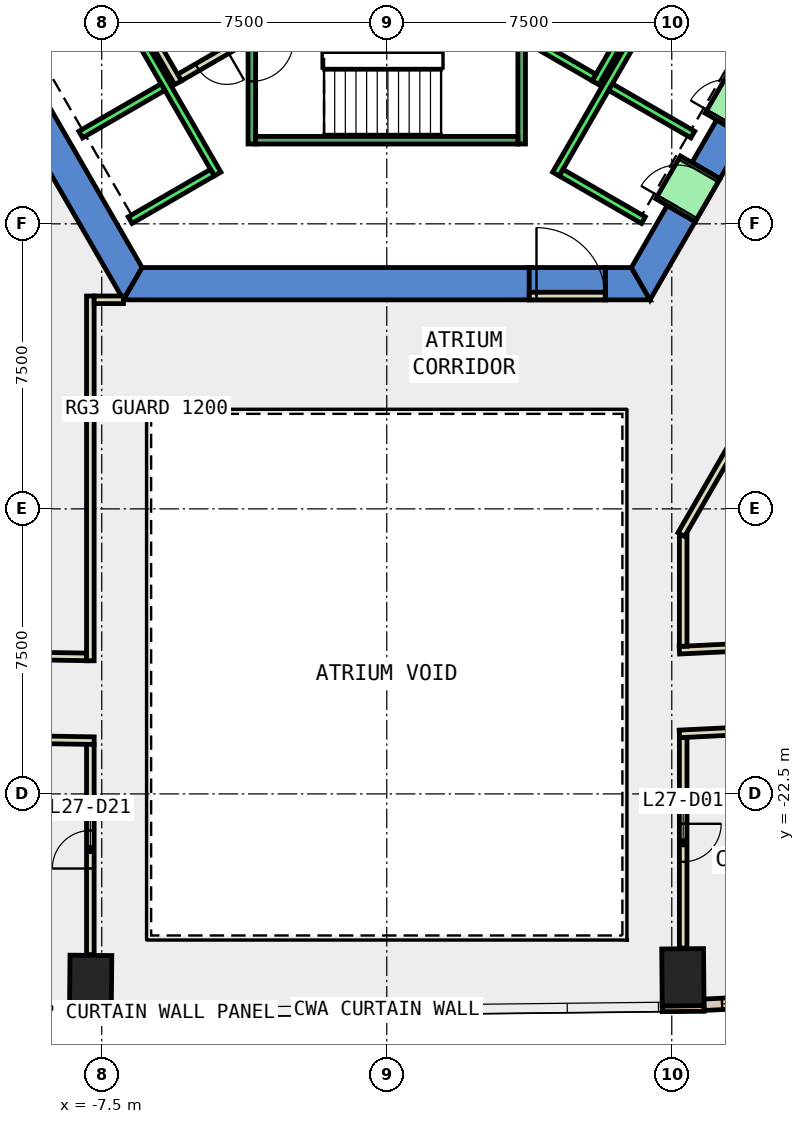
"""IFC4 building model, lengths in metres.
Left out: names, types, materials, properties, quantities, classifications, styles, units other than length and angle.
Written with IfcOpenShell. Run it as: python <this file> out.ifc"""

import sys

from ifc_helpers import new_model, si_unit, direction, frame, frame_2d, origin, origin_2d, place, context, subcontext, project, spatial, polyline, rectangle, outline, extrude, element, fill, save


model = new_model("IFC4")
c1 = context("Model", 3, precision=1e-05, world=origin(), true_north=direction((0.0, 1.0)))
c2 = subcontext(c1, "Body", "Model", "MODEL_VIEW")
j1 = project(units=[si_unit("LENGTHUNIT", "METRE"), si_unit("PLANEANGLEUNIT", "RADIAN")], contexts=[c1])
p1 = place(None, origin())
s1 = spatial("IfcSite", under=j1, at=p1, CompositionType="ELEMENT")
p2 = place(p1, origin())
s2 = spatial("IfcBuilding", under=s1, at=p2, CompositionType="ELEMENT")
p3 = place(p2, frame((0.0, 0.0, 124.4)))
s3 = spatial("IfcBuildingStorey", under=s2, at=p3, CompositionType="ELEMENT", Elevation=124.4)
for number, where, z_axis, x_axis in (
    (1, (-7.792, -27.498, -0.4), (0.0, 0.0, 1.0), (-1.0, 0.009, 0.0)),
    (2, (7.792, -27.325, -0.4), (0.0, 0.0, 1.0), (1.0, 0.009, 0.0)),
):
    element("IfcColumn", number, at=place(p3, frame(where, z_axis=z_axis, x_axis=x_axis)), inside=s3, PredefinedType="COLUMN", context=c2, shape_type="SweptSolid", body=[
        extrude(rectangle(XDim=1.1, YDim=1.5, at=origin_2d()), origin(), (0.0, 0.0, 1.0), 4.2),
    ])
p4 = place(p3, frame((0.0, 0.0, -0.4)))
e3 = element("IfcWall", 3, at=p4, inside=s3, PredefinedType="SHEAR", context=c2, shape_type="SweptSolid", body=[
    extrude(outline(polyline([(-13.856, 2.5), (-6.928, -9.5), (-6.437, -8.65), (-12.875, 2.5), (-13.856, 2.5)])), origin(), (0.0, 0.0, 1.0), 4.2),
])
p5 = place(p3, frame((0.0, 0.0, -0.4)))
e4 = element("IfcWall", 4, at=p5, inside=s3, PredefinedType="SHEAR", context=c2, shape_type="SweptSolid", body=[
    extrude(outline(polyline([(3.75, -9.5), (3.75, -8.65), (-6.437, -8.65), (-6.928, -9.5), (3.75, -9.5)])), origin(), (0.0, 0.0, 1.0), 4.2),
])
p6 = place(p3, frame((0.0, 0.0, -0.4)))
e5 = element("IfcWall", 5, at=p6, inside=s3, PredefinedType="SHEAR", context=c2, shape_type="SweptSolid", body=[
    extrude(outline(polyline([(5.75, -8.65), (5.75, -9.5), (6.928, -9.5), (6.437, -8.65), (5.75, -8.65)])), origin(), (0.0, 0.0, 1.0), 4.2),
])
p7 = place(p3, frame((0.0, 0.0, 3.6)))
e6 = element("IfcWall", 6, at=p7, inside=s3, PredefinedType="SHEAR", context=c2, shape_type="SweptSolid", body=[
    extrude(outline(polyline([(5.75, -9.5), (5.75, -8.65), (3.75, -8.65), (3.75, -9.5), (5.75, -9.5)])), origin(), (0.0, 0.0, 1.0), 0.2),
])
p8 = place(p3, frame((0.0, 0.0, -0.4)))
e7 = element("IfcWall", 7, at=p8, inside=s3, PredefinedType="SHEAR", context=c2, shape_type="SweptSolid", body=[
    extrude(outline(polyline([(8.117, -7.44), (7.381, -7.015), (6.437, -8.65), (6.928, -9.5), (8.117, -7.44)])), origin(), (0.0, 0.0, 1.0), 4.2),
])
p9 = place(p3, frame((0.0, 0.0, -0.4)))
e8 = element("IfcWall", 8, at=p9, inside=s3, PredefinedType="SHEAR", context=c2, shape_type="SweptSolid", body=[
    extrude(outline(polyline([(9.417, -5.189), (8.681, -4.764), (8.031, -5.889), (8.767, -6.314), (9.417, -5.189)])), origin(), (0.0, 0.0, 1.0), 4.2),
])
p10 = place(p3, frame((0.0, 0.0, 3.6)))
e9 = element("IfcWall", 9, at=p10, inside=s3, PredefinedType="SHEAR", context=c2, shape_type="SweptSolid", body=[
    extrude(outline(polyline([(8.767, -6.314), (8.031, -5.889), (7.381, -7.015), (8.117, -7.44), (8.767, -6.314)])), origin(), (0.0, 0.0, 1.0), 0.2),
])
p11 = place(p3, frame((0.0, 0.0, 3.6)))
e10 = element("IfcWall", 10, at=p11, inside=s3, PredefinedType="SHEAR", context=c2, shape_type="SweptSolid", body=[
    extrude(outline(polyline([(10.067, -4.063), (9.331, -3.638), (8.681, -4.764), (9.417, -5.189), (10.067, -4.063)])), origin(), (0.0, 0.0, 1.0), 0.2),
])
for number, where, z_axis, x_axis in (
    (11, (-8.349, -28.318, 0.0), (0.0, 0.0, 1.0), (1.0, -0.009, 0.0)),
    (12, (7.249, -28.155, 0.0), (0.0, 0.0, 1.0), (1.0, 0.009, 0.0)),
):
    element("IfcWall", number, at=place(p3, frame(where, z_axis=z_axis, x_axis=x_axis)), inside=s3, PredefinedType="STANDARD", context=c2, shape_type="SweptSolid", body=[
        extrude(rectangle(XDim=1.1, YDim=0.15, at=frame_2d((0.55, 0.0))), origin(), (0.0, 0.0, 1.0), 3.8),
    ])
p12 = place(p3, frame((-14.242, -28.141, 0.0), z_axis=(0.0, 0.0, 1.0), x_axis=(0.999862081538, -0.016607766328, 0.0)))
e13 = element("IfcWall", 13, at=p12, inside=s3, PredefinedType="STANDARD", context=c2, shape_type="SweptSolid", body=[
    extrude(rectangle(XDim=5.895, YDim=0.3, at=frame_2d((2.947, 0.0))), origin(), (0.0, 0.0, 1.0), 3.8),
])
p13 = place(p12, frame((0.474, 0.0, 0.9)))
e14 = element("IfcOpeningElement", 14, at=p13, cuts=e13, PredefinedType="OPENING", context=c2, shape_type="SweptSolid", body=[
    extrude(rectangle(XDim=2.0, YDim=2.6, at=frame_2d((1.0, 1.3))), frame((0.0, 0.16, 0.0), z_axis=(0.0, -1.0, 0.0), x_axis=(1.0, 0.0, 0.0)), (0.0, 0.0, 1.0), 0.32),
])
p14 = place(p12, frame((3.421, 0.0, 0.9)))
e15 = element("IfcOpeningElement", 15, at=p14, cuts=e13, PredefinedType="OPENING", context=c2, shape_type="SweptSolid", body=[
    extrude(rectangle(XDim=2.0, YDim=2.6, at=frame_2d((1.0, 1.3))), frame((0.0, 0.16, 0.0), z_axis=(0.0, -1.0, 0.0), x_axis=(1.0, 0.0, 0.0)), (0.0, 0.0, 1.0), 0.32),
])
p15 = place(p3, frame((8.347, -28.048, 0.0), z_axis=(0.0, 0.0, 1.0), x_axis=(0.998840459798, 0.048142869367, 0.0)))
e16 = element("IfcWall", 16, at=p15, inside=s3, PredefinedType="STANDARD", context=c2, shape_type="SweptSolid", body=[
    extrude(rectangle(XDim=5.903, YDim=0.3, at=frame_2d((2.951, 0.0))), origin(), (0.0, 0.0, 1.0), 3.8),
])
p16 = place(p15, frame((0.476, 0.0, 0.9)))
e17 = element("IfcOpeningElement", 17, at=p16, cuts=e16, PredefinedType="OPENING", context=c2, shape_type="SweptSolid", body=[
    extrude(rectangle(XDim=2.0, YDim=2.6, at=frame_2d((1.0, 1.3))), frame((0.0, 0.16, 0.0), z_axis=(0.0, -1.0, 0.0), x_axis=(1.0, 0.0, 0.0)), (0.0, 0.0, 1.0), 0.32),
])
p17 = place(p15, frame((3.427, 0.0, 0.9)))
e18 = element("IfcOpeningElement", 18, at=p17, cuts=e16, PredefinedType="OPENING", context=c2, shape_type="SweptSolid", body=[
    extrude(rectangle(XDim=2.0, YDim=2.6, at=frame_2d((1.0, 1.3))), frame((0.0, 0.16, 0.0), z_axis=(0.0, -1.0, 0.0), x_axis=(1.0, 0.0, 0.0)), (0.0, 0.0, 1.0), 0.32),
])
p18 = place(p3, frame((7.7, -18.719, 0.0), z_axis=(0.0, 0.0, 1.0), x_axis=(0.998829118209, 0.048377604502, 0.0)))
e19 = element("IfcWall", 19, at=p18, inside=s3, PredefinedType="PARTITIONING", context=c2, shape_type="SweptSolid", body=[
    extrude(rectangle(XDim=6.596, YDim=0.2, at=frame_2d((3.298, 0.0))), origin(), (0.0, 0.0, 1.0), 3.8),
])
p19 = place(p3, frame((-14.589, -18.784, 0.0), z_axis=(0.0, 0.0, 1.0), x_axis=(0.999862141497, -0.016604156151, 0.0)))
e20 = element("IfcWall", 20, at=p19, inside=s3, PredefinedType="PARTITIONING", context=c2, shape_type="SweptSolid", body=[
    extrude(rectangle(XDim=6.69, YDim=0.2, at=frame_2d((3.345, 0.0))), origin(), (0.0, 0.0, 1.0), 3.8),
])
p20 = place(p3, frame((14.481, -20.594, 0.0), z_axis=(0.0, 0.0, 1.0), x_axis=(-0.998839976403, -0.048152897512, 0.0)))
e21 = element("IfcWall", 21, at=p20, inside=s3, PredefinedType="PARTITIONING", context=c2, shape_type="SweptSolid", body=[
    extrude(rectangle(XDim=6.789, YDim=0.2, at=frame_2d((3.395, 0.0))), origin(), (0.0, 0.0, 1.0), 3.8),
])
p21 = place(p3, frame((-7.7, -21.099, 0.0), z_axis=(0.0, 0.0, 1.0), x_axis=(-0.999861998162, 0.016612785183, 0.0)))
e22 = element("IfcWall", 22, at=p21, inside=s3, PredefinedType="PARTITIONING", context=c2, shape_type="SweptSolid", body=[
    extrude(rectangle(XDim=6.863, YDim=0.2, at=frame_2d((3.432, 0.0))), origin(), (0.0, 0.0, 1.0), 3.8),
])
p22 = place(p3, frame((-3.65, -2.61, 0.0), z_axis=(0.0, 0.0, 1.0), x_axis=(-0.866072462134, -0.499918483688, 0.0)))
e23 = element("IfcWall", 23, at=p22, inside=s3, PredefinedType="PARTITIONING", context=c2, shape_type="SweptSolid", body=[
    extrude(rectangle(XDim=2.084, YDim=0.2, at=frame_2d((1.042, 0.0))), origin(), (0.0, 0.0, 1.0), 3.8),
])
p23 = place(p22, frame((0.642, 0.0, 0.0)))
e24 = element("IfcOpeningElement", 24, at=p23, cuts=e23, PredefinedType="OPENING", context=c2, shape_type="SweptSolid", body=[
    extrude(rectangle(XDim=0.9, YDim=2.1, at=frame_2d((0.45, 1.05))), frame((0.0, 0.11, 0.0), z_axis=(0.0, -1.0, 0.0), x_axis=(1.0, 0.0, 0.0)), (0.0, 0.0, 1.0), 0.22),
])
p24 = place(p3, frame((-5.492, -3.788, 0.0), z_axis=(0.0, 0.0, 1.0), x_axis=(-0.500008949224, 0.866020236886, 0.0)))
e25 = element("IfcWall", 25, at=p24, inside=s3, PredefinedType="PARTITIONING", context=c2, shape_type="SweptSolid", body=[
    extrude(rectangle(XDim=2.68, YDim=0.2, at=frame_2d((1.34, 0.0))), origin(), (0.0, 0.0, 1.0), 3.8),
])
p25 = place(p3, frame((7.8, -15.69, 0.0), z_axis=(0.0, 0.0, 1.0), x_axis=(0.0, -1.0, 0.0)))
e26 = element("IfcWall", 26, at=p25, inside=s3, PredefinedType="PARTITIONING", context=c2, shape_type="SweptSolid", body=[
    extrude(rectangle(XDim=2.924, YDim=0.2, at=frame_2d((1.462, 0.0))), origin(), (0.0, 0.0, 1.0), 3.8),
])
p26 = place(p3, frame((-7.8, -18.997, 0.0), z_axis=(0.0, 0.0, 1.0), x_axis=(0.0, 1.0, 0.0)))
e27 = element("IfcWall", 27, at=p26, inside=s3, PredefinedType="PARTITIONING", context=c2, shape_type="SweptSolid", body=[
    extrude(rectangle(XDim=9.598, YDim=0.2, at=frame_2d((4.799, 0.0))), origin(), (0.0, 0.0, 1.0), 3.8),
])
p27 = place(p3, frame((-7.7, -9.499, 0.0), z_axis=(0.0, 0.0, 1.0), x_axis=(1.0, 0.0, 0.0)))
e28 = element("IfcWall", 28, at=p27, inside=s3, PredefinedType="PARTITIONING", context=c2, shape_type="SweptSolid", body=[
    extrude(rectangle(XDim=0.771, YDim=0.2, at=frame_2d((0.385, 0.0))), origin(), (0.0, 0.0, 1.0), 3.8),
])
p28 = place(p3, frame((7.8, -21.017, 0.0), z_axis=(0.0, 0.0, 1.0), x_axis=(0.0, -1.0, 0.0)))
e29 = element("IfcWall", 29, at=p28, inside=s3, PredefinedType="PARTITIONING", context=c2, shape_type="SweptSolid", body=[
    extrude(rectangle(XDim=5.538, YDim=0.2, at=frame_2d((2.769, 0.0))), origin(), (0.0, 0.0, 1.0), 3.8),
])
p29 = place(p28, frame((2.269, 0.0, 0.0)))
e30 = element("IfcOpeningElement", 30, at=p29, cuts=e29, PredefinedType="OPENING", context=c2, shape_type="SweptSolid", body=[
    extrude(rectangle(XDim=1.0, YDim=2.1, at=frame_2d((0.5, 1.05))), frame((0.0, 0.11, 0.0), z_axis=(0.0, -1.0, 0.0), x_axis=(1.0, 0.0, 0.0)), (0.0, 0.0, 1.0), 0.22),
])
p30 = place(p3, frame((-7.8, -26.728, 0.0), z_axis=(0.0, 0.0, 1.0), x_axis=(0.0, 1.0, 0.0)))
e31 = element("IfcWall", 31, at=p30, inside=s3, PredefinedType="PARTITIONING", context=c2, shape_type="SweptSolid", body=[
    extrude(rectangle(XDim=5.531, YDim=0.2, at=frame_2d((2.766, 0.0))), origin(), (0.0, 0.0, 1.0), 3.8),
])
p31 = place(p30, frame((2.265, 0.0, 0.0)))
e32 = element("IfcOpeningElement", 32, at=p31, cuts=e31, PredefinedType="OPENING", context=c2, shape_type="SweptSolid", body=[
    extrude(rectangle(XDim=1.0, YDim=2.1, at=frame_2d((0.5, 1.05))), frame((0.0, 0.11, 0.0), z_axis=(0.0, -1.0, 0.0), x_axis=(1.0, 0.0, 0.0)), (0.0, 0.0, 1.0), 0.22),
])
p32 = place(p3, frame((3.75, -9.4, 0.0), z_axis=(0.0, 0.0, 1.0), x_axis=(1.0, 0.0, 0.0)))
e33 = element("IfcWall", 33, at=p32, inside=s3, PredefinedType="PARTITIONING", context=c2, shape_type="SweptSolid", body=[
    extrude(rectangle(XDim=2.0, YDim=0.2, at=frame_2d((1.0, 0.0))), origin(), (0.0, 0.0, 1.0), 2.4),
])
p33 = place(p32, frame((0.19, 0.0, 0.0)))
e34 = element("IfcOpeningElement", 34, at=p33, cuts=e33, PredefinedType="OPENING", context=c2, shape_type="SweptSolid", body=[
    extrude(rectangle(XDim=1.8, YDim=2.1, at=frame_2d((0.9, 1.05))), frame((0.0, 0.11, 0.0), z_axis=(0.0, -1.0, 0.0), x_axis=(1.0, 0.0, 0.0)), (0.0, 0.0, 1.0), 0.22),
])
p34 = place(p3, frame((12.401, -7.621, 0.0), z_axis=(0.0, 0.0, 1.0), x_axis=(-0.499983724212, -0.866034800411, 0.0)))
e35 = element("IfcWall", 35, at=p34, inside=s3, PredefinedType="PARTITIONING", context=c2, shape_type="SweptSolid", body=[
    extrude(rectangle(XDim=9.302, YDim=0.2, at=frame_2d((4.651, 0.0))), origin(), (0.0, 0.0, 1.0), 3.8),
])
p35 = place(p34, frame((0.231, 0.0, 0.0)))
e36 = element("IfcOpeningElement", 36, at=p35, cuts=e35, PredefinedType="OPENING", context=c2, shape_type="SweptSolid", body=[
    extrude(rectangle(XDim=1.0, YDim=2.1, at=frame_2d((0.5, 1.05))), frame((0.0, 0.11, 0.0), z_axis=(0.0, -1.0, 0.0), x_axis=(1.0, 0.0, 0.0)), (0.0, 0.0, 1.0), 0.22),
])
p36 = place(p34, frame((1.331, 0.0, 0.0)))
e37 = element("IfcOpeningElement", 37, at=p36, cuts=e35, PredefinedType="OPENING", context=c2, shape_type="SweptSolid", body=[
    extrude(rectangle(XDim=1.0, YDim=2.1, at=frame_2d((0.5, 1.05))), frame((0.0, 0.11, 0.0), z_axis=(0.0, -1.0, 0.0), x_axis=(1.0, 0.0, 0.0)), (0.0, 0.0, 1.0), 0.22),
])
p37 = place(p3, frame((-9.751, 2.99, 0.0), z_axis=(0.0, 0.0, 1.0), x_axis=(0.50000090737, -0.866024879913, 0.0)))
e38 = element("IfcWall", 38, at=p37, inside=s3, PredefinedType="STANDARD", context=c2, shape_type="SweptSolid", body=[
    extrude(rectangle(XDim=10.6, YDim=0.2, at=frame_2d((5.3, 0.0))), origin(), (0.0, 0.0, 1.0), 3.8),
])
for number, where, z_axis, x_axis in (
    (39, (-5.888, -3.902, 0.0), (0.0, 0.0, 1.0), (-0.866, -0.5, 0.0)),
    (40, (-4.588, -6.153, 0.0), (0.0, 0.0, 1.0), (-0.866, -0.5, 0.0)),
):
    element("IfcWall", number, at=place(p3, frame(where, z_axis=z_axis, x_axis=x_axis)), inside=s3, PredefinedType="STANDARD", context=c2, shape_type="SweptSolid", body=[
        extrude(rectangle(XDim=2.5, YDim=0.2, at=frame_2d((1.25, 0.0))), origin(), (0.0, 0.0, 1.0), 3.8),
    ])
p38 = place(p3, frame((5.492, -3.788, 0.0), z_axis=(0.0, 0.0, 1.0), x_axis=(0.500011755427, 0.866018616679, 0.0)))
e41 = element("IfcWall", 41, at=p38, inside=s3, PredefinedType="STANDARD", context=c2, shape_type="SweptSolid", body=[
    extrude(rectangle(XDim=2.8, YDim=0.2, at=frame_2d((1.4, 0.0))), origin(), (0.0, 0.0, 1.0), 3.8),
])
p39 = place(p3, frame((3.377, -2.452, 0.0), z_axis=(0.0, 0.0, 1.0), x_axis=(0.865955154139, -0.50012165622, 0.0)))
e42 = element("IfcWall", 42, at=p39, inside=s3, PredefinedType="STANDARD", context=c2, shape_type="SweptSolid", body=[
    extrude(rectangle(XDim=2.4, YDim=0.2, at=frame_2d((1.2, 0.0))), origin(), (0.0, 0.0, 1.0), 3.8),
])
p40 = place(p3, frame((4.451, -6.19, 0.0), z_axis=(0.0, 0.0, 1.0), x_axis=(0.50000090737, 0.866024879913, 0.0)))
e43 = element("IfcWall", 43, at=p40, inside=s3, PredefinedType="STANDARD", context=c2, shape_type="SweptSolid", body=[
    extrude(rectangle(XDim=10.6, YDim=0.2, at=frame_2d((5.3, 0.0))), origin(), (0.0, 0.0, 1.0), 3.8),
])
for number, where, z_axis, x_axis in (
    (44, (4.588, -6.153, 0.0), (0.0, 0.0, 1.0), (0.866, -0.5, 0.0)),
    (45, (5.888, -3.902, 0.0), (0.0, 0.0, 1.0), (0.866, -0.5, 0.0)),
):
    element("IfcWall", number, at=place(p3, frame(where, z_axis=z_axis, x_axis=x_axis)), inside=s3, PredefinedType="STANDARD", context=c2, shape_type="SweptSolid", body=[
        extrude(rectangle(XDim=2.5, YDim=0.2, at=frame_2d((1.25, 0.0))), origin(), (0.0, 0.0, 1.0), 3.8),
    ])
p41 = place(p3, frame((7.598, -7.14, 0.0), z_axis=(0.0, 0.0, 1.0), x_axis=(0.500362116554, 0.865816234728, 0.0)))
e46 = element("IfcWall", 46, at=p41, inside=s3, PredefinedType="STANDARD", context=c2, shape_type="SweptSolid", body=[
    extrude(rectangle(XDim=1.299, YDim=1.2, at=frame_2d((0.65, 0.0))), origin(), (0.0, 0.0, 1.0), 2.4),
])
p42 = place(p41, frame((0.1, 0.0, 0.0)))
e47 = element("IfcOpeningElement", 47, at=p42, cuts=e46, PredefinedType="OPENING", context=c2, shape_type="SweptSolid", body=[
    extrude(rectangle(XDim=1.1, YDim=2.3, at=frame_2d((0.55, 1.15))), frame((0.0, 0.61, 0.0), z_axis=(0.0, -1.0, 0.0), x_axis=(1.0, 0.0, 0.0)), (0.0, 0.0, 1.0), 1.22),
])
p43 = place(p3, frame((8.898, -4.889, 0.0), z_axis=(0.0, 0.0, 1.0), x_axis=(0.500036693733, 0.866004217611, 0.0)))
e48 = element("IfcWall", 48, at=p43, inside=s3, PredefinedType="STANDARD", context=c2, shape_type="SweptSolid", body=[
    extrude(rectangle(XDim=1.3, YDim=1.2, at=frame_2d((0.65, 0.0))), origin(), (0.0, 0.0, 1.0), 2.4),
])
p44 = place(p43, frame((0.1, 0.0, 0.0)))
e49 = element("IfcOpeningElement", 49, at=p44, cuts=e48, PredefinedType="OPENING", context=c2, shape_type="SweptSolid", body=[
    extrude(rectangle(XDim=1.1, YDim=2.3, at=frame_2d((0.55, 1.15))), frame((0.0, 0.61, 0.0), z_axis=(0.0, -1.0, 0.0), x_axis=(1.0, 0.0, 0.0)), (0.0, 0.0, 1.0), 1.22),
])
p45 = place(p3, frame((-3.55, -1.0, 0.0), z_axis=(0.0, 0.0, 1.0), x_axis=(0.0, -1.0, 0.0)))
e50 = element("IfcWall", 50, at=p45, inside=s3, PredefinedType="STANDARD", context=c2, shape_type="SweptSolid", body=[
    extrude(rectangle(XDim=4.4, YDim=0.2, at=frame_2d((2.2, 0.0))), origin(), (0.0, 0.0, 1.0), 3.8),
])
p46 = place(p45, frame((1.65, 0.0, 0.0)))
e51 = element("IfcOpeningElement", 51, at=p46, cuts=e50, PredefinedType="OPENING", context=c2, shape_type="SweptSolid", body=[
    extrude(rectangle(XDim=1.1, YDim=2.2, at=frame_2d((0.55, 1.1))), frame((0.0, 0.11, 0.0), z_axis=(0.0, -1.0, 0.0), x_axis=(1.0, 0.0, 0.0)), (0.0, 0.0, 1.0), 0.22),
])
p47 = place(p3, frame((3.55, -2.667, 0.0), z_axis=(0.0, 0.0, 1.0), x_axis=(0.0, -1.0, 0.0)))
e52 = element("IfcWall", 52, at=p47, inside=s3, PredefinedType="STANDARD", context=c2, shape_type="SweptSolid", body=[
    extrude(rectangle(XDim=2.733, YDim=0.2, at=frame_2d((1.366, 0.0))), origin(), (0.0, 0.0, 1.0), 3.8),
])
p48 = place(p3, frame((-3.45, -5.3, 0.0), z_axis=(0.0, 0.0, 1.0), x_axis=(1.0, 0.0, 0.0)))
e53 = element("IfcWall", 53, at=p48, inside=s3, PredefinedType="STANDARD", context=c2, shape_type="SweptSolid", body=[
    extrude(rectangle(XDim=6.9, YDim=0.2, at=frame_2d((3.45, 0.0))), origin(), (0.0, 0.0, 1.0), 3.8),
])
p49 = place(p16, origin())
e54 = element("IfcWindow", 54, at=p49, inside=s3, PartitioningType="SINGLE_PANEL", PredefinedType="WINDOW", context=c2, shape_type="SweptSolid", body=[
    extrude(rectangle(XDim=2.0, YDim=2.6, at=frame_2d((1.0, 1.3))), frame((0.0, 0.03, 0.0), z_axis=(0.0, -1.0, 0.0), x_axis=(1.0, 0.0, 0.0)), (0.0, 0.0, 1.0), 0.06),
])
fill(e17, e54)
p50 = place(p29, origin())
e55 = element("IfcDoor", 55, at=p50, inside=s3, OperationType="SINGLE_SWING_LEFT", PredefinedType="DOOR", context=c2, shape_type="SweptSolid", body=[
    extrude(rectangle(XDim=1.0, YDim=2.1, at=frame_2d((0.5, 1.05))), frame((0.0, 0.025, 0.0), z_axis=(0.0, -1.0, 0.0), x_axis=(1.0, 0.0, 0.0)), (0.0, 0.0, 1.0), 0.05),
])
fill(e30, e55)
p51 = place(p31, origin())
e56 = element("IfcDoor", 56, at=p51, inside=s3, OperationType="SINGLE_SWING_LEFT", PredefinedType="DOOR", context=c2, shape_type="SweptSolid", body=[
    extrude(rectangle(XDim=1.0, YDim=2.1, at=frame_2d((0.5, 1.05))), frame((0.0, 0.025, 0.0), z_axis=(0.0, -1.0, 0.0), x_axis=(1.0, 0.0, 0.0)), (0.0, 0.0, 1.0), 0.05),
])
fill(e32, e56)
p52 = place(p23, origin())
e57 = element("IfcDoor", 57, at=p52, inside=s3, OperationType="SINGLE_SWING_LEFT", PredefinedType="DOOR", context=c2, shape_type="SweptSolid", body=[
    extrude(rectangle(XDim=0.9, YDim=2.1, at=frame_2d((0.45, 1.05))), frame((0.0, 0.025, 0.0), z_axis=(0.0, -1.0, 0.0), x_axis=(1.0, 0.0, 0.0)), (0.0, 0.0, 1.0), 0.05),
])
fill(e24, e57)
p53 = place(p33, origin())
e58 = element("IfcDoor", 58, at=p53, inside=s3, OperationType="DOUBLE_DOOR_SINGLE_SWING", PredefinedType="DOOR", context=c2, shape_type="SweptSolid", body=[
    extrude(rectangle(XDim=1.8, YDim=2.1, at=frame_2d((0.9, 1.05))), frame((0.0, 0.025, 0.0), z_axis=(0.0, -1.0, 0.0), x_axis=(1.0, 0.0, 0.0)), (0.0, 0.0, 1.0), 0.05),
])
fill(e34, e58)
p54 = place(p42, origin())
e59 = element("IfcDoor", 59, at=p54, inside=s3, OperationType="SLIDING_TO_LEFT", PredefinedType="DOOR", context=c2, shape_type="SweptSolid", body=[
    extrude(rectangle(XDim=1.1, YDim=2.3, at=frame_2d((0.55, 1.15))), frame((0.0, 0.025, 0.0), z_axis=(0.0, -1.0, 0.0), x_axis=(1.0, 0.0, 0.0)), (0.0, 0.0, 1.0), 0.05),
])
fill(e47, e59)
p55 = place(p46, origin())
e60 = element("IfcDoor", 60, at=p55, inside=s3, OperationType="SINGLE_SWING_LEFT", PredefinedType="DOOR", context=c2, shape_type="SweptSolid", body=[
    extrude(rectangle(XDim=1.1, YDim=2.2, at=frame_2d((0.55, 1.1))), frame((0.0, 0.025, 0.0), z_axis=(0.0, -1.0, 0.0), x_axis=(1.0, 0.0, 0.0)), (0.0, 0.0, 1.0), 0.05),
])
fill(e51, e60)
save(model, sys.argv[1])
